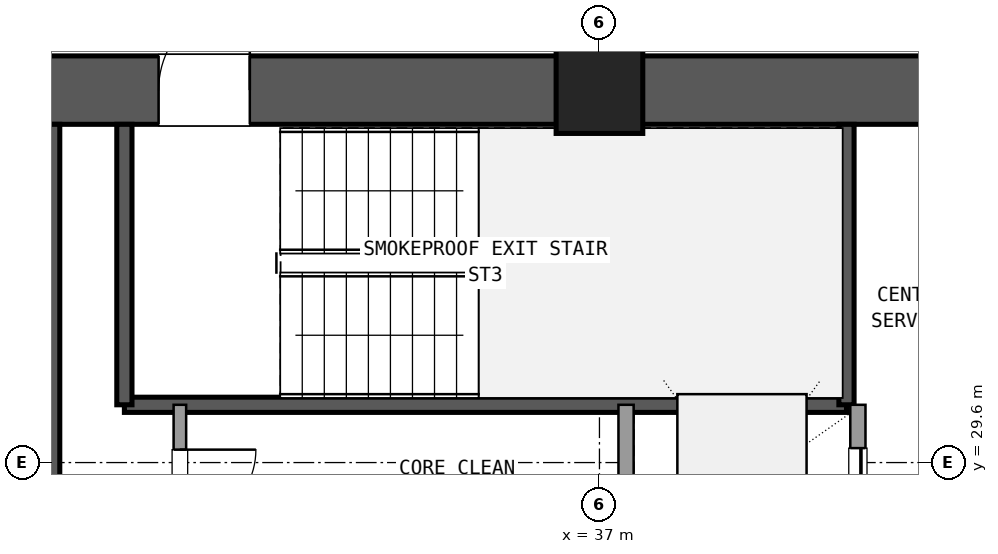
"""IFC4 building model, lengths in metres.
Left out: names, types, materials, properties, quantities, classifications, styles, units other than length and angle.
Written with IfcOpenShell. Run it as: python <this file> out.ifc"""

import sys

from ifc_helpers import new_model, si_unit, direction, frame, frame_2d, origin, origin_2d, place, context, subcontext, project, spatial, rectangle, extrude, element, fill, save


model = new_model("IFC4")
c1 = context("Model", 3, precision=1e-05, world=origin(), true_north=direction((0.0, 1.0)))
c2 = subcontext(c1, "Body", "Model", "MODEL_VIEW")
j1 = project(units=[si_unit("LENGTHUNIT", "METRE"), si_unit("PLANEANGLEUNIT", "RADIAN")], contexts=[c1])
p1 = place(None, origin())
s1 = spatial("IfcSite", under=j1, at=p1, CompositionType="ELEMENT")
p2 = place(p1, origin())
s2 = spatial("IfcBuilding", under=s1, at=p2, CompositionType="ELEMENT")
p3 = place(p2, frame((0.0, 0.0, 34.74)))
s3 = spatial("IfcBuildingStorey", under=s2, at=p3, CompositionType="ELEMENT", Elevation=34.74)
p4 = place(p3, frame((37.0, 34.5, 0.0), z_axis=(0.0, 0.0, 1.0), x_axis=(1.0, 0.0, 0.0)))
e1 = element("IfcColumn", 1, at=p4, inside=s3, PredefinedType="COLUMN", context=c2, shape_type="SweptSolid", body=[
    extrude(rectangle(XDim=1.14, YDim=1.14, at=origin_2d()), origin(), (0.0, 0.0, 1.0), 3.6),
])
p5 = place(p3, frame((47.635, 34.5, 0.0), z_axis=(0.0, 0.0, 1.0), x_axis=(-1.0, 0.0, 0.0)))
e2 = element("IfcWall", 2, at=p5, inside=s3, PredefinedType="SHEAR", context=c2, shape_type="SweptSolid", body=[
    extrude(rectangle(XDim=10.07, YDim=0.9, at=frame_2d((5.035, 0.0))), origin(), (0.0, 0.0, 1.0), 3.32),
])
p6 = place(p5, frame((4.535, 0.0, 0.0)))
e3 = element("IfcOpeningElement", 3, at=p6, cuts=e2, PredefinedType="OPENING", context=c2, shape_type="SweptSolid", body=[
    extrude(rectangle(XDim=1.6, YDim=2.2, at=frame_2d((0.8, 1.1))), frame((0.0, 0.46, 0.0), z_axis=(0.0, -1.0, 0.0), x_axis=(1.0, 0.0, 0.0)), (0.0, 0.0, 1.0), 0.92),
])
p7 = place(p3, frame((36.435, 34.5, 0.0), z_axis=(0.0, 0.0, 1.0), x_axis=(-1.0, 0.0, 0.0)))
e4 = element("IfcWall", 4, at=p7, inside=s3, PredefinedType="SHEAR", context=c2, shape_type="SweptSolid", body=[
    extrude(rectangle(XDim=10.07, YDim=0.9, at=frame_2d((5.035, 0.0))), origin(), (0.0, 0.0, 1.0), 3.32),
])
p8 = place(p7, frame((4.035, 0.0, 0.0)))
e5 = element("IfcOpeningElement", 5, at=p8, cuts=e4, PredefinedType="OPENING", context=c2, shape_type="SweptSolid", body=[
    extrude(rectangle(XDim=1.2, YDim=2.15, at=frame_2d((0.6, 1.075))), frame((0.0, 0.46, 0.0), z_axis=(0.0, -1.0, 0.0), x_axis=(1.0, 0.0, 0.0)), (0.0, 0.0, 1.0), 0.92),
])
p9 = place(p3, frame((29.8, 24.65, 0.0), z_axis=(0.0, 0.0, 1.0), x_axis=(0.0, 1.0, 0.0)))
e6 = element("IfcWall", 6, at=p9, inside=s3, PredefinedType="SHEAR", context=c2, shape_type="SweptSolid", body=[
    extrude(rectangle(XDim=9.4, YDim=0.2, at=frame_2d((4.7, 0.0))), origin(), (0.0, 0.0, 1.0), 3.32),
])
p10 = place(p3, frame((30.75, 30.36, 0.0), z_axis=(0.0, 0.0, 1.0), x_axis=(1.0, 0.0, 0.0)))
e7 = element("IfcWall", 7, at=p10, inside=s3, PredefinedType="SHEAR", context=c2, shape_type="SweptSolid", body=[
    extrude(rectangle(XDim=9.5, YDim=0.2, at=frame_2d((4.75, 0.0))), origin(), (0.0, 0.0, 1.0), 3.32),
])
for number, where, z_axis, x_axis in (
    (8, (30.75, 30.36, 0.0), (0.0, 0.0, 1.0), (0.0, 1.0, 0.0)),
    (9, (40.25, 30.36, 0.0), (0.0, 0.0, 1.0), (0.0, 1.0, 0.0)),
):
    element("IfcWall", number, at=place(p3, frame(where, z_axis=z_axis, x_axis=x_axis)), inside=s3, PredefinedType="SHEAR", context=c2, shape_type="SweptSolid", body=[
        extrude(rectangle(XDim=3.69, YDim=0.2, at=frame_2d((1.845, 0.0))), origin(), (0.0, 0.0, 1.0), 3.32),
    ])
p11 = place(p3, frame((37.35, 23.54, 0.0), z_axis=(0.0, 0.0, 1.0), x_axis=(0.0, 1.0, 0.0)))
e10 = element("IfcWall", 10, at=p11, inside=s3, PredefinedType="SOLIDWALL", context=c2, shape_type="SweptSolid", body=[
    extrude(rectangle(XDim=6.82, YDim=0.2, at=frame_2d((3.41, 0.0))), origin(), (0.0, 0.0, 1.0), 2.61),
])
p12 = place(p3, frame((40.4, 23.54, 0.0), z_axis=(0.0, 0.0, 1.0), x_axis=(0.0, 1.0, 0.0)))
e11 = element("IfcWall", 11, at=p12, inside=s3, PredefinedType="SOLIDWALL", context=c2, shape_type="SweptSolid", body=[
    extrude(rectangle(XDim=6.82, YDim=0.2, at=frame_2d((3.41, 0.0))), origin(), (0.0, 0.0, 1.0), 2.61),
])
p13 = place(p12, frame((0.35, 0.0, 0.0)))
e12 = element("IfcOpeningElement", 12, at=p13, cuts=e11, PredefinedType="OPENING", context=c2, shape_type="SweptSolid", body=[
    extrude(rectangle(XDim=1.4, YDim=2.2, at=frame_2d((0.7, 1.1))), frame((0.0, 0.11, 0.0), z_axis=(0.0, -1.0, 0.0), x_axis=(1.0, 0.0, 0.0)), (0.0, 0.0, 1.0), 0.22),
])
p14 = place(p12, frame((2.65, 0.0, 0.0)))
e13 = element("IfcOpeningElement", 13, at=p14, cuts=e11, PredefinedType="OPENING", context=c2, shape_type="SweptSolid", body=[
    extrude(rectangle(XDim=1.4, YDim=2.2, at=frame_2d((0.7, 1.1))), frame((0.0, 0.11, 0.0), z_axis=(0.0, -1.0, 0.0), x_axis=(1.0, 0.0, 0.0)), (0.0, 0.0, 1.0), 0.22),
])
p15 = place(p12, frame((4.85, 0.0, 0.0)))
e14 = element("IfcOpeningElement", 14, at=p15, cuts=e11, PredefinedType="OPENING", context=c2, shape_type="SweptSolid", body=[
    extrude(rectangle(XDim=1.4, YDim=2.2, at=frame_2d((0.7, 1.1))), frame((0.0, 0.11, 0.0), z_axis=(0.0, -1.0, 0.0), x_axis=(1.0, 0.0, 0.0)), (0.0, 0.0, 1.0), 0.22),
])
p16 = place(p3, frame((31.48, 26.32, 0.0), z_axis=(0.0, 0.0, 1.0), x_axis=(0.0, 1.0, 0.0)))
e15 = element("IfcWall", 15, at=p16, inside=s3, PredefinedType="PLUMBINGWALL", context=c2, shape_type="SweptSolid", body=[
    extrude(rectangle(XDim=4.04, YDim=0.165, at=frame_2d((2.02, 0.0))), origin(), (0.0, 0.0, 1.0), 2.61),
])
p17 = place(p16, frame((0.5, 0.0, 0.0)))
e16 = element("IfcOpeningElement", 16, at=p17, cuts=e15, PredefinedType="OPENING", context=c2, shape_type="SweptSolid", body=[
    extrude(rectangle(XDim=0.95, YDim=2.1, at=frame_2d((0.475, 1.05))), frame((0.0, 0.093, 0.0), z_axis=(0.0, -1.0, 0.0), x_axis=(1.0, 0.0, 0.0)), (0.0, 0.0, 1.0), 0.185),
])
p18 = place(p16, frame((2.45, 0.0, 0.0)))
e17 = element("IfcOpeningElement", 17, at=p18, cuts=e15, PredefinedType="OPENING", context=c2, shape_type="SweptSolid", body=[
    extrude(rectangle(XDim=1.0, YDim=2.15, at=frame_2d((0.5, 1.075))), frame((0.0, 0.093, 0.0), z_axis=(0.0, -1.0, 0.0), x_axis=(1.0, 0.0, 0.0)), (0.0, 0.0, 1.0), 0.185),
])
p19 = place(p3, frame((37.0, 34.95, 0.0), z_axis=(0.0, 0.0, 1.0), x_axis=(0.0, 1.0, 0.0)))
e18 = element("IfcWall", 18, at=p19, inside=s3, PredefinedType="PARTITIONING", context=c2, shape_type="SweptSolid", body=[
    extrude(rectangle(XDim=2.7, YDim=0.18, at=frame_2d((1.35, 0.0))), origin(), (0.0, 0.0, 1.0), 2.61),
])
p20 = place(p19, frame((0.35, 0.0, 0.0)))
e19 = element("IfcOpeningElement", 19, at=p20, cuts=e18, PredefinedType="OPENING", context=c2, shape_type="SweptSolid", body=[
    extrude(rectangle(XDim=2.0, YDim=2.2, at=frame_2d((1.0, 1.1))), frame((0.0, 0.1, 0.0), z_axis=(0.0, -1.0, 0.0), x_axis=(1.0, 0.0, 0.0)), (0.0, 0.0, 1.0), 0.2),
])
p21 = place(p8, frame((1.2, 0.0, 0.0), z_axis=(0.0, 0.0, 1.0), x_axis=(-1.0, 0.0, 0.0)))
e20 = element("IfcDoor", 20, at=p21, inside=s3, OperationType="SINGLE_SWING_LEFT", PredefinedType="DOOR", context=c2, shape_type="SweptSolid", body=[
    extrude(rectangle(XDim=1.2, YDim=2.15, at=frame_2d((0.6, 1.075))), frame((0.0, 0.025, 0.0), z_axis=(0.0, -1.0, 0.0), x_axis=(1.0, 0.0, 0.0)), (0.0, 0.0, 1.0), 0.05),
])
fill(e5, e20)
p22 = place(p15, origin())
e21 = element("IfcDoor", 21, at=p22, inside=s3, OperationType="SLIDING_TO_RIGHT", PredefinedType="DOOR", context=c2, shape_type="SweptSolid", body=[
    extrude(rectangle(XDim=1.4, YDim=2.2, at=frame_2d((0.7, 1.1))), frame((0.0, 0.025, 0.0), z_axis=(0.0, -1.0, 0.0), x_axis=(1.0, 0.0, 0.0)), (0.0, 0.0, 1.0), 0.05),
])
fill(e14, e21)
p23 = place(p18, frame((1.0, 0.0, 0.0), z_axis=(0.0, 0.0, 1.0), x_axis=(-1.0, 0.0, 0.0)))
e22 = element("IfcDoor", 22, at=p23, inside=s3, OperationType="SINGLE_SWING_RIGHT", PredefinedType="DOOR", context=c2, shape_type="SweptSolid", body=[
    extrude(rectangle(XDim=1.0, YDim=2.15, at=frame_2d((0.5, 1.075))), frame((0.0, 0.025, 0.0), z_axis=(0.0, -1.0, 0.0), x_axis=(1.0, 0.0, 0.0)), (0.0, 0.0, 1.0), 0.05),
])
fill(e17, e22)
save(model, sys.argv[1])
